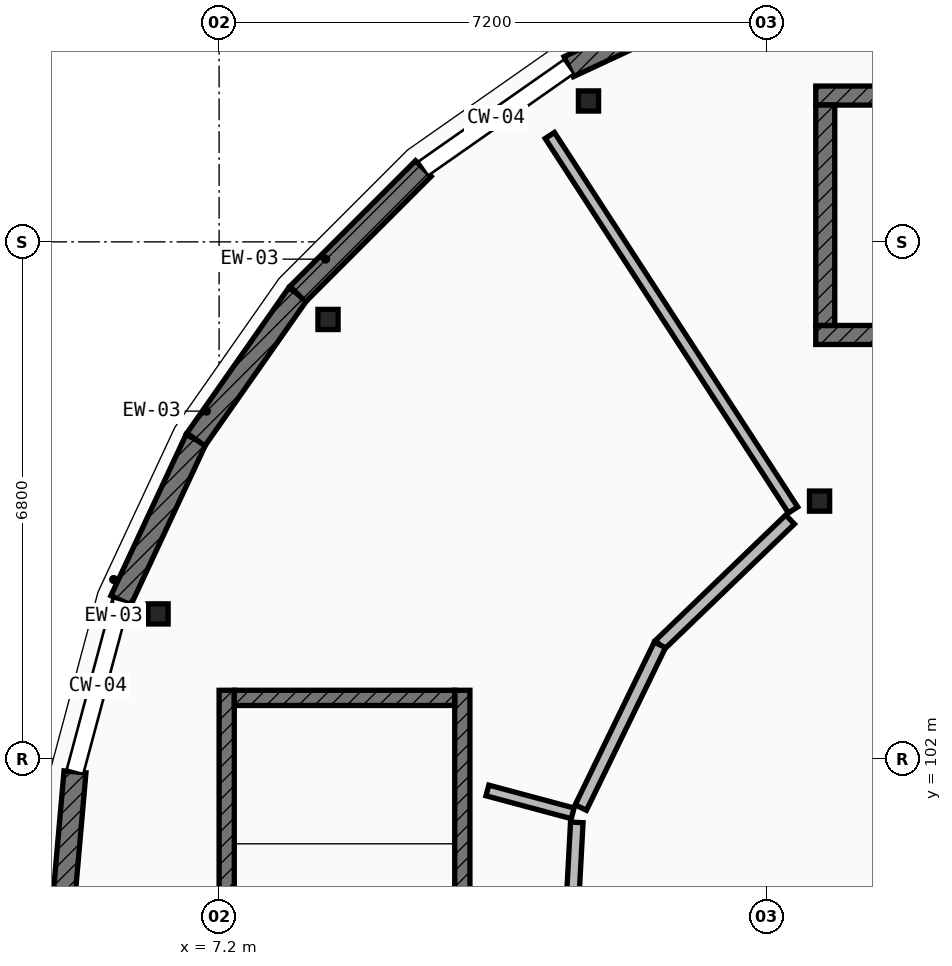
"""IFC4 building model, lengths in metres.
Left out: names, types, materials, properties, quantities, classifications, styles, units other than length and angle.
Written with IfcOpenShell. Run it as: python <this file> out.ifc"""

import sys

from ifc_helpers import new_model, si_unit, direction, frame, frame_2d, origin, origin_2d, place, context, subcontext, project, spatial, rectangle, extrude, element, fill, save


model = new_model("IFC4")
c1 = context("Model", 3, precision=1e-05, world=origin(), true_north=direction((0.0, 1.0)))
c2 = subcontext(c1, "Body", "Model", "MODEL_VIEW")
j1 = project(units=[si_unit("LENGTHUNIT", "METRE"), si_unit("PLANEANGLEUNIT", "RADIAN")], contexts=[c1])
p1 = place(None, origin())
s1 = spatial("IfcSite", under=j1, at=p1, CompositionType="ELEMENT")
p2 = place(p1, origin())
s2 = spatial("IfcBuilding", under=s1, at=p2, CompositionType="ELEMENT")
p3 = place(p2, frame((0.0, 0.0, 17.15)))
s3 = spatial("IfcBuildingStorey", under=s2, at=p3, CompositionType="ELEMENT", Elevation=17.15)
for number, where, z_axis, x_axis in (
    (1, (12.06, 110.654, 0.0), (0.0, 0.0, 1.0), (1.0, 0.0, 0.0)),
    (2, (8.633, 107.779, 0.0), (0.0, 0.0, 1.0), (1.0, 0.0, 0.0)),
    (3, (6.397, 103.905, 0.0), (0.0, 0.0, 1.0), (1.0, 0.0, 0.0)),
    (4, (15.1, 105.389, 0.0), (0.0, 0.0, 1.0), (1.0, 0.0, 0.0)),
):
    element("IfcColumn", number, at=place(p3, frame(where, z_axis=z_axis, x_axis=x_axis)), inside=s3, PredefinedType="COLUMN", context=c2, shape_type="SweptSolid", body=[
        extrude(rectangle(XDim=0.265, YDim=0.265, at=origin_2d()), origin(), (0.0, 0.0, 1.0), 4.2),
    ])
p4 = place(p3, frame((5.1, 99.5, 0.0), z_axis=(0.0, 0.0, 1.0), x_axis=(0.087274565792, 0.996184295282, 0.0)))
e5 = element("IfcWall", 5, at=p4, inside=s3, PredefinedType="ELEMENTEDWALL", context=c2, shape_type="SweptSolid", body=[
    extrude(rectangle(XDim=2.336, YDim=0.29, at=frame_2d((1.168, 0.0))), origin(), (0.0, 0.0, 1.0), 3.369),
])
p5 = place(p3, frame((5.908, 104.083, 0.0), z_axis=(0.0, 0.0, 1.0), x_axis=(0.422587894318, 0.906321946979, 0.0)))
e6 = element("IfcWall", 6, at=p5, inside=s3, PredefinedType="ELEMENTEDWALL", context=c2, shape_type="SweptSolid", body=[
    extrude(rectangle(XDim=2.336, YDim=0.29, at=frame_2d((1.168, 0.0))), origin(), (0.0, 0.0, 1.0), 3.369),
])
p6 = place(p5, frame((0.493, 0.0, 0.85)))
e7 = element("IfcOpeningElement", 7, at=p6, cuts=e6, PredefinedType="OPENING", context=c2, shape_type="SweptSolid", body=[
    extrude(rectangle(XDim=1.35, YDim=1.85, at=frame_2d((0.675, 0.925))), frame((0.0, 0.155, 0.0), z_axis=(0.0, -1.0, 0.0), x_axis=(1.0, 0.0, 0.0)), (0.0, 0.0, 1.0), 0.31),
])
p7 = place(p3, frame((6.895, 106.2, 0.0), z_axis=(0.0, 0.0, 1.0), x_axis=(0.573728883722, 0.819045278347, 0.0)))
e8 = element("IfcWall", 8, at=p7, inside=s3, PredefinedType="ELEMENTEDWALL", context=c2, shape_type="SweptSolid", body=[
    extrude(rectangle(XDim=2.336, YDim=0.29, at=frame_2d((1.168, 0.0))), origin(), (0.0, 0.0, 1.0), 3.369),
])
p8 = place(p7, frame((0.493, 0.0, 0.85)))
e9 = element("IfcOpeningElement", 9, at=p8, cuts=e8, PredefinedType="OPENING", context=c2, shape_type="SweptSolid", body=[
    extrude(rectangle(XDim=1.35, YDim=2.15, at=frame_2d((0.675, 1.075))), frame((0.0, 0.155, 0.0), z_axis=(0.0, -1.0, 0.0), x_axis=(1.0, 0.0, 0.0)), (0.0, 0.0, 1.0), 0.31),
])
p9 = place(p3, frame((8.235, 108.113, 0.0), z_axis=(0.0, 0.0, 1.0), x_axis=(0.707106781187, 0.707106781187, 0.0)))
e10 = element("IfcWall", 10, at=p9, inside=s3, PredefinedType="ELEMENTEDWALL", context=c2, shape_type="SweptSolid", body=[
    extrude(rectangle(XDim=2.336, YDim=0.29, at=frame_2d((1.168, 0.0))), origin(), (0.0, 0.0, 1.0), 3.369),
])
p10 = place(p9, frame((0.478, 0.0, 0.85)))
e11 = element("IfcOpeningElement", 11, at=p10, cuts=e10, PredefinedType="OPENING", context=c2, shape_type="SweptSolid", body=[
    extrude(rectangle(XDim=1.38, YDim=1.7, at=frame_2d((0.69, 0.85))), frame((0.0, 0.155, 0.0), z_axis=(0.0, -1.0, 0.0), x_axis=(1.0, 0.0, 0.0)), (0.0, 0.0, 1.0), 0.31),
])
p11 = place(p3, frame((11.8, 111.105, 0.0), z_axis=(0.0, 0.0, 1.0), x_axis=(0.906321946979, 0.422587894318, 0.0)))
e12 = element("IfcWall", 12, at=p11, inside=s3, PredefinedType="ELEMENTEDWALL", context=c2, shape_type="SweptSolid", body=[
    extrude(rectangle(XDim=2.336, YDim=0.29, at=frame_2d((1.168, 0.0))), origin(), (0.0, 0.0, 1.0), 3.369),
])
p12 = place(p11, frame((0.468, 0.0, 0.85)))
e13 = element("IfcOpeningElement", 13, at=p12, cuts=e12, PredefinedType="OPENING", context=c2, shape_type="SweptSolid", body=[
    extrude(rectangle(XDim=1.4, YDim=1.25, at=frame_2d((0.7, 0.625))), frame((0.0, 0.155, 0.0), z_axis=(0.0, -1.0, 0.0), x_axis=(1.0, 0.0, 0.0)), (0.0, 0.0, 1.0), 0.31),
])
p13 = place(p3, frame((15.05, 107.575, 0.0), z_axis=(0.0, 0.0, 1.0), x_axis=(1.0, 0.0, 0.0)))
e14 = element("IfcWall", 14, at=p13, inside=s3, PredefinedType="SHEAR", context=c2, shape_type="SweptSolid", body=[
    extrude(rectangle(XDim=6.9, YDim=0.25, at=frame_2d((3.45, 0.0))), origin(), (0.0, 0.0, 1.0), 4.015),
])
p14 = place(p13, frame((0.43, 0.0, 0.0)))
e15 = element("IfcOpeningElement", 15, at=p14, cuts=e14, PredefinedType="OPENING", context=c2, shape_type="SweptSolid", body=[
    extrude(rectangle(XDim=1.1, YDim=2.15, at=frame_2d((0.55, 1.075))), frame((0.0, 0.135, 0.0), z_axis=(0.0, -1.0, 0.0), x_axis=(1.0, 0.0, 0.0)), (0.0, 0.0, 1.0), 0.27),
])
p15 = place(p3, frame((15.05, 110.725, 0.0), z_axis=(0.0, 0.0, 1.0), x_axis=(1.0, 0.0, 0.0)))
e16 = element("IfcWall", 16, at=p15, inside=s3, PredefinedType="SHEAR", context=c2, shape_type="SweptSolid", body=[
    extrude(rectangle(XDim=6.9, YDim=0.25, at=frame_2d((3.45, 0.0))), origin(), (0.0, 0.0, 1.0), 4.015),
])
p16 = place(p3, frame((15.175, 107.7, 0.0), z_axis=(0.0, 0.0, 1.0), x_axis=(0.0, 1.0, 0.0)))
e17 = element("IfcWall", 17, at=p16, inside=s3, PredefinedType="SHEAR", context=c2, shape_type="SweptSolid", body=[
    extrude(rectangle(XDim=2.9, YDim=0.25, at=frame_2d((1.45, 0.0))), origin(), (0.0, 0.0, 1.0), 4.015),
])
p17 = place(p3, frame((10.4, 96.1, 0.0), z_axis=(0.0, 0.0, 1.0), x_axis=(0.0, 1.0, 0.0)))
e18 = element("IfcWall", 18, at=p17, inside=s3, PredefinedType="SHEAR", context=c2, shape_type="SweptSolid", body=[
    extrude(rectangle(XDim=6.8, YDim=0.2, at=frame_2d((3.4, 0.0))), origin(), (0.0, 0.0, 1.0), 4.015),
])
p18 = place(p17, frame((0.38, 0.0, 0.0)))
e19 = element("IfcOpeningElement", 19, at=p18, cuts=e18, PredefinedType="OPENING", context=c2, shape_type="SweptSolid", body=[
    extrude(rectangle(XDim=1.05, YDim=2.15, at=frame_2d((0.525, 1.075))), frame((0.0, 0.11, 0.0), z_axis=(0.0, -1.0, 0.0), x_axis=(1.0, 0.0, 0.0)), (0.0, 0.0, 1.0), 0.22),
])
p19 = place(p3, frame((7.3, 96.1, 0.0), z_axis=(0.0, 0.0, 1.0), x_axis=(0.0, 1.0, 0.0)))
e20 = element("IfcWall", 20, at=p19, inside=s3, PredefinedType="SHEAR", context=c2, shape_type="SweptSolid", body=[
    extrude(rectangle(XDim=6.8, YDim=0.2, at=frame_2d((3.4, 0.0))), origin(), (0.0, 0.0, 1.0), 4.015),
])
p20 = place(p3, frame((10.3, 102.8, 0.0), z_axis=(0.0, 0.0, 1.0), x_axis=(-1.0, 0.0, 0.0)))
e21 = element("IfcWall", 21, at=p20, inside=s3, PredefinedType="SHEAR", context=c2, shape_type="SweptSolid", body=[
    extrude(rectangle(XDim=2.9, YDim=0.2, at=frame_2d((1.45, 0.0))), origin(), (0.0, 0.0, 1.0), 4.015),
])
p21 = place(p3, frame((14.751, 105.273, 0.0), z_axis=(0.0, 0.0, 1.0), x_axis=(-0.544677189284, 0.838645789039, 0.0)))
e22 = element("IfcWall", 22, at=p21, inside=s3, PredefinedType="PARTITIONING", context=c2, shape_type="SweptSolid", body=[
    extrude(rectangle(XDim=5.875, YDim=0.145, at=frame_2d((2.938, 0.0))), origin(), (0.0, 0.0, 1.0), 3.344),
])
p22 = place(p3, frame((11.852, 101.281, 0.0), z_axis=(0.0, 0.0, 1.0), x_axis=(-0.965846685591, 0.259114221787, 0.0)))
e23 = element("IfcWall", 23, at=p22, inside=s3, PredefinedType="PARTITIONING", context=c2, shape_type="SweptSolid", body=[
    extrude(rectangle(XDim=1.162, YDim=0.145, at=frame_2d((0.581, 0.0))), origin(), (0.0, 0.0, 1.0), 3.344),
])
p23 = place(p3, frame((14.712, 105.147, 0.0), z_axis=(0.0, 0.0, 1.0), x_axis=(-0.720225223762, -0.693740316731, 0.0)))
e24 = element("IfcWall", 24, at=p23, inside=s3, PredefinedType="PARTITIONING", context=c2, shape_type="SweptSolid", body=[
    extrude(rectangle(XDim=2.378, YDim=0.165, at=frame_2d((1.189, 0.0))), origin(), (0.0, 0.0, 1.0), 3.344),
])
p24 = place(p23, frame((0.69, 0.0, 0.0)))
e25 = element("IfcOpeningElement", 25, at=p24, cuts=e24, PredefinedType="OPENING", context=c2, shape_type="SweptSolid", body=[
    extrude(rectangle(XDim=1.0, YDim=2.14, at=frame_2d((0.5, 1.07))), frame((0.0, 0.093, 0.0), z_axis=(0.0, -1.0, 0.0), x_axis=(1.0, 0.0, 0.0)), (0.0, 0.0, 1.0), 0.185),
])
p25 = place(p3, frame((12.999, 103.497, 0.0), z_axis=(0.0, 0.0, 1.0), x_axis=(-0.437088964267, -0.899418277175, 0.0)))
e26 = element("IfcWall", 26, at=p25, inside=s3, PredefinedType="PARTITIONING", context=c2, shape_type="SweptSolid", body=[
    extrude(rectangle(XDim=2.379, YDim=0.165, at=frame_2d((1.19, 0.0))), origin(), (0.0, 0.0, 1.0), 3.344),
])
p26 = place(p3, frame((11.906, 101.162, 0.0), z_axis=(0.0, 0.0, 1.0), x_axis=(-0.053559631757, -0.998564652812, 0.0)))
e27 = element("IfcWall", 27, at=p26, inside=s3, PredefinedType="PARTITIONING", context=c2, shape_type="SweptSolid", body=[
    extrude(rectangle(XDim=2.612, YDim=0.165, at=frame_2d((1.306, 0.0))), origin(), (0.0, 0.0, 1.0), 3.344),
])
p27 = place(p26, frame((0.786, 0.0, 0.0)))
e28 = element("IfcOpeningElement", 28, at=p27, cuts=e27, PredefinedType="OPENING", context=c2, shape_type="SweptSolid", body=[
    extrude(rectangle(XDim=1.04, YDim=2.14, at=frame_2d((0.52, 1.07))), frame((0.0, 0.093, 0.0), z_axis=(0.0, -1.0, 0.0), x_axis=(1.0, 0.0, 0.0)), (0.0, 0.0, 1.0), 0.185),
])
p28 = place(p6, origin())
e29 = element("IfcWindow", 29, at=p28, inside=s3, PartitioningType="SINGLE_PANEL", PredefinedType="WINDOW", context=c2, shape_type="SweptSolid", body=[
    extrude(rectangle(XDim=1.35, YDim=1.85, at=frame_2d((0.675, 0.925))), frame((0.0, 0.03, 0.0), z_axis=(0.0, -1.0, 0.0), x_axis=(1.0, 0.0, 0.0)), (0.0, 0.0, 1.0), 0.06),
])
fill(e7, e29)
p29 = place(p8, origin())
e30 = element("IfcWindow", 30, at=p29, inside=s3, PartitioningType="SINGLE_PANEL", PredefinedType="WINDOW", context=c2, shape_type="SweptSolid", body=[
    extrude(rectangle(XDim=1.35, YDim=2.15, at=frame_2d((0.675, 1.075))), frame((0.0, 0.03, 0.0), z_axis=(0.0, -1.0, 0.0), x_axis=(1.0, 0.0, 0.0)), (0.0, 0.0, 1.0), 0.06),
])
fill(e9, e30)
p30 = place(p10, origin())
e31 = element("IfcWindow", 31, at=p30, inside=s3, PartitioningType="SINGLE_PANEL", PredefinedType="WINDOW", context=c2, shape_type="SweptSolid", body=[
    extrude(rectangle(XDim=1.38, YDim=1.7, at=frame_2d((0.69, 0.85))), frame((0.0, 0.03, 0.0), z_axis=(0.0, -1.0, 0.0), x_axis=(1.0, 0.0, 0.0)), (0.0, 0.0, 1.0), 0.06),
])
fill(e11, e31)
p31 = place(p12, origin())
e32 = element("IfcWindow", 32, at=p31, inside=s3, PartitioningType="SINGLE_PANEL", PredefinedType="WINDOW", context=c2, shape_type="SweptSolid", body=[
    extrude(rectangle(XDim=1.4, YDim=1.25, at=frame_2d((0.7, 0.625))), frame((0.0, 0.03, 0.0), z_axis=(0.0, -1.0, 0.0), x_axis=(1.0, 0.0, 0.0)), (0.0, 0.0, 1.0), 0.06),
])
fill(e13, e32)
p32 = place(p14, origin())
e33 = element("IfcDoor", 33, at=p32, inside=s3, OperationType="SINGLE_SWING_RIGHT", PredefinedType="DOOR", context=c2, shape_type="SweptSolid", body=[
    extrude(rectangle(XDim=1.1, YDim=2.15, at=frame_2d((0.55, 1.075))), frame((0.0, 0.025, 0.0), z_axis=(0.0, -1.0, 0.0), x_axis=(1.0, 0.0, 0.0)), (0.0, 0.0, 1.0), 0.05),
])
fill(e15, e33)
p33 = place(p24, origin())
e34 = element("IfcDoor", 34, at=p33, inside=s3, OperationType="SINGLE_SWING_LEFT", PredefinedType="DOOR", context=c2, shape_type="SweptSolid", body=[
    extrude(rectangle(XDim=1.0, YDim=2.14, at=frame_2d((0.5, 1.07))), frame((0.0, 0.025, 0.0), z_axis=(0.0, -1.0, 0.0), x_axis=(1.0, 0.0, 0.0)), (0.0, 0.0, 1.0), 0.05),
])
fill(e25, e34)
p34 = place(p27, origin())
e35 = element("IfcDoor", 35, at=p34, inside=s3, OperationType="SINGLE_SWING_RIGHT", PredefinedType="DOOR", context=c2, shape_type="SweptSolid", body=[
    extrude(rectangle(XDim=1.04, YDim=2.14, at=frame_2d((0.52, 1.07))), frame((0.0, 0.025, 0.0), z_axis=(0.0, -1.0, 0.0), x_axis=(1.0, 0.0, 0.0)), (0.0, 0.0, 1.0), 0.05),
])
fill(e28, e35)
save(model, sys.argv[1])
